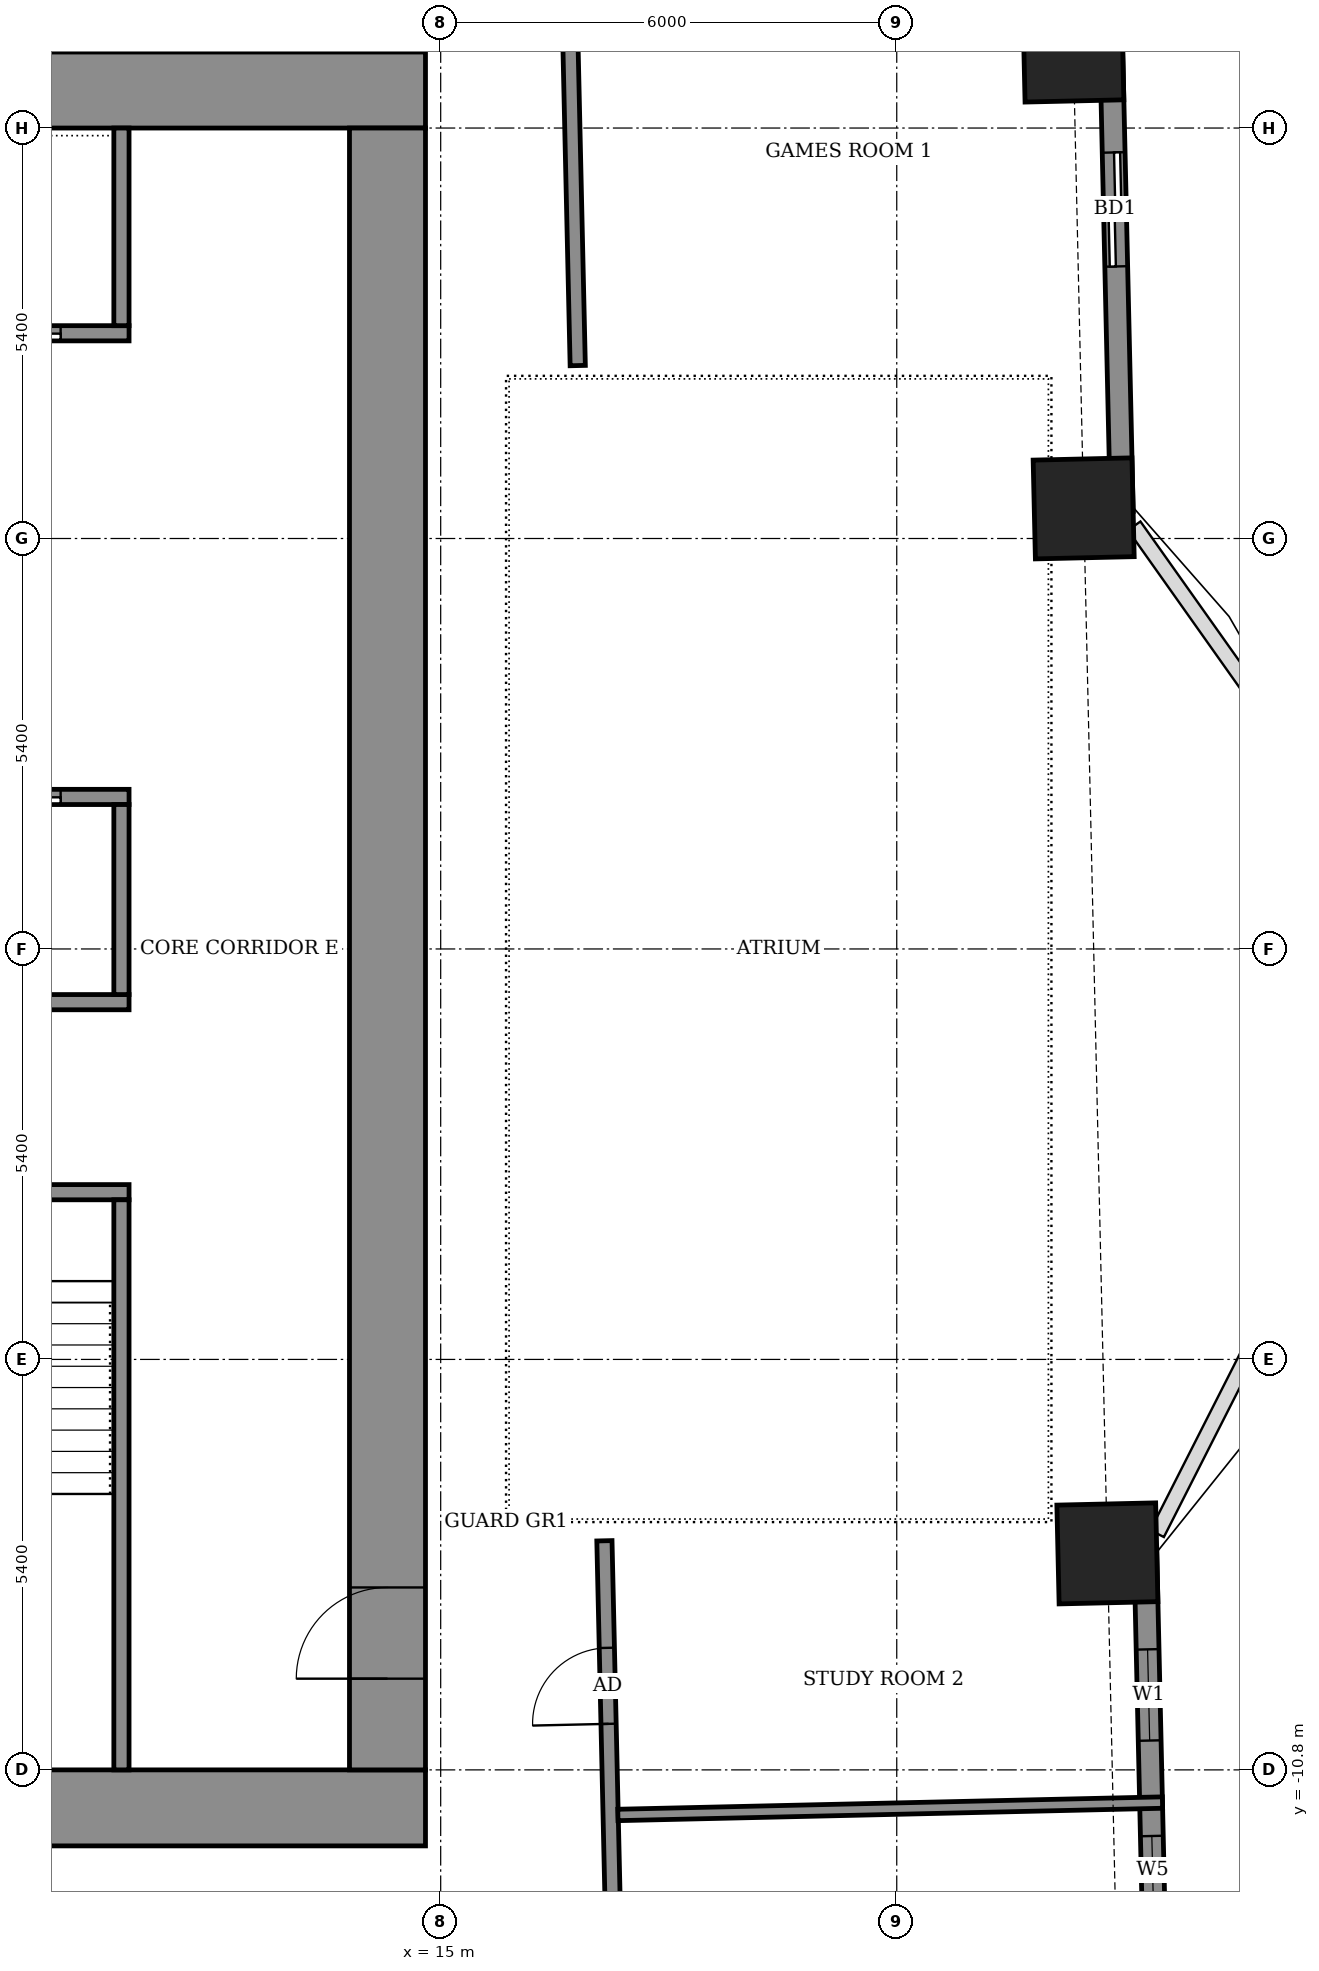
"""IFC4 building model, lengths in metres.
Left out: names, types, materials, properties, quantities, classifications, styles, units other than length and angle.
Written with IfcOpenShell. Run it as: python <this file> out.ifc"""

import sys

from ifc_helpers import new_model, si_unit, direction, frame, frame_2d, origin, origin_2d, place, context, subcontext, project, spatial, rectangle, extrude, element, fill, save


model = new_model("IFC4")
c1 = context("Model", 3, precision=1e-05, world=origin(), true_north=direction((0.0, 1.0)))
c2 = subcontext(c1, "Body", "Model", "MODEL_VIEW")
j1 = project(units=[si_unit("LENGTHUNIT", "METRE"), si_unit("PLANEANGLEUNIT", "RADIAN")], contexts=[c1])
p1 = place(None, origin())
s1 = spatial("IfcSite", under=j1, at=p1, CompositionType="ELEMENT")
p2 = place(p1, origin())
s2 = spatial("IfcBuilding", under=s1, at=p2, CompositionType="ELEMENT")
p3 = place(p2, frame((0.0, 0.0, 137.3)))
s3 = spatial("IfcBuildingStorey", under=s2, at=p3, CompositionType="ELEMENT", Elevation=137.3)
for number, where, z_axis, x_axis in (
    (1, (23.771, -7.952, -0.55), (0.0, 0.0, 1.0), (-0.023, 1.0, 0.0)),
    (2, (23.459, 5.796, -0.55), (0.0, 0.0, 1.0), (-0.023, 1.0, 0.0)),
    (3, (23.323, 11.806, -0.55), (0.0, 0.0, 1.0), (-0.023, 1.0, 0.0)),
):
    element("IfcColumn", number, at=place(p3, frame(where, z_axis=z_axis, x_axis=x_axis)), inside=s3, PredefinedType="COLUMN", context=c2, shape_type="SweptSolid", body=[
        extrude(rectangle(XDim=1.3, YDim=1.3, at=origin_2d()), origin(), (0.0, 0.0, 1.0), 3.6),
    ])
p4 = place(p3, frame((24.518, -18.812, 0.0), z_axis=(0.0, 0.0, 1.0), x_axis=(-0.02269451316, 0.999742446369, 0.0)))
e4 = element("IfcWall", 4, at=p4, inside=s3, PredefinedType="SOLIDWALL", context=c2, shape_type="SweptSolid", body=[
    extrude(rectangle(XDim=10.93, YDim=0.3, at=frame_2d((5.465, 0.0))), origin(), (0.0, 0.0, 1.0), 3.05),
])
p5 = place(p4, frame((1.496, 0.0, 0.0)))
e5 = element("IfcOpeningElement", 5, at=p5, cuts=e4, PredefinedType="OPENING", context=c2, shape_type="SweptSolid", body=[
    extrude(rectangle(XDim=1.5, YDim=2.4, at=frame_2d((0.75, 1.2))), frame((0.0, 0.16, 0.0), z_axis=(0.0, -1.0, 0.0), x_axis=(1.0, 0.0, 0.0)), (0.0, 0.0, 1.0), 0.32),
])
p6 = place(p4, frame((6.244, 0.0, 0.9)))
e6 = element("IfcOpeningElement", 6, at=p6, cuts=e4, PredefinedType="OPENING", context=c2, shape_type="SweptSolid", body=[
    extrude(rectangle(XDim=0.9, YDim=1.5, at=frame_2d((0.45, 0.75))), frame((0.0, 0.16, 0.0), z_axis=(0.0, -1.0, 0.0), x_axis=(1.0, 0.0, 0.0)), (0.0, 0.0, 1.0), 0.32),
])
p7 = place(p4, frame((8.4, 0.0, 0.9)))
e7 = element("IfcOpeningElement", 7, at=p7, cuts=e4, PredefinedType="OPENING", context=c2, shape_type="SweptSolid", body=[
    extrude(rectangle(XDim=1.2, YDim=1.5, at=frame_2d((0.6, 0.75))), frame((0.0, 0.16, 0.0), z_axis=(0.0, -1.0, 0.0), x_axis=(1.0, 0.0, 0.0)), (0.0, 0.0, 1.0), 0.32),
])
p8 = place(p3, frame((23.961, 5.752, 0.0), z_axis=(0.0, 0.0, 1.0), x_axis=(-0.022715362207, 0.999741972871, 0.0)))
e8 = element("IfcWall", 8, at=p8, inside=s3, PredefinedType="SOLIDWALL", context=c2, shape_type="SweptSolid", body=[
    extrude(rectangle(XDim=11.93, YDim=0.3, at=frame_2d((5.965, 0.0))), origin(), (0.0, 0.0, 1.0), 3.05),
])
p9 = place(p8, frame((3.228, 0.0, 0.0)))
e9 = element("IfcOpeningElement", 9, at=p9, cuts=e8, PredefinedType="OPENING", context=c2, shape_type="SweptSolid", body=[
    extrude(rectangle(XDim=1.5, YDim=2.4, at=frame_2d((0.75, 1.2))), frame((0.0, 0.16, 0.0), z_axis=(0.0, -1.0, 0.0), x_axis=(1.0, 0.0, 0.0)), (0.0, 0.0, 1.0), 0.32),
])
p10 = place(p8, frame((7.629, 0.0, 0.9)))
e10 = element("IfcOpeningElement", 10, at=p10, cuts=e8, PredefinedType="OPENING", context=c2, shape_type="SweptSolid", body=[
    extrude(rectangle(XDim=0.9, YDim=1.5, at=frame_2d((0.45, 0.75))), frame((0.0, 0.16, 0.0), z_axis=(0.0, -1.0, 0.0), x_axis=(1.0, 0.0, 0.0)), (0.0, 0.0, 1.0), 0.32),
])
p11 = place(p8, frame((9.316, 0.0, 0.9)))
e11 = element("IfcOpeningElement", 11, at=p11, cuts=e8, PredefinedType="OPENING", context=c2, shape_type="SweptSolid", body=[
    extrude(rectangle(XDim=1.2, YDim=1.5, at=frame_2d((0.6, 0.75))), frame((0.0, 0.16, 0.0), z_axis=(0.0, -1.0, 0.0), x_axis=(1.0, 0.0, 0.0)), (0.0, 0.0, 1.0), 0.32),
])
p12 = place(p3, frame((17.328, -15.448, 0.0), z_axis=(0.0, 0.0, 1.0), x_axis=(-0.022680883318, 0.999742755679, 0.0)))
e12 = element("IfcWall", 12, at=p12, inside=s3, PredefinedType="PARTITIONING", context=c2, shape_type="SweptSolid", body=[
    extrude(rectangle(XDim=7.664, YDim=0.2, at=frame_2d((3.832, 0.0))), origin(), (0.0, 0.0, 1.0), 3.05),
])
p13 = place(p12, frame((5.255, 0.0, 0.0)))
e13 = element("IfcOpeningElement", 13, at=p13, cuts=e12, PredefinedType="OPENING", context=c2, shape_type="SweptSolid", body=[
    extrude(rectangle(XDim=1.0, YDim=2.1, at=frame_2d((0.5, 1.05))), frame((0.0, 0.11, 0.0), z_axis=(0.0, -1.0, 0.0), x_axis=(1.0, 0.0, 0.0)), (0.0, 0.0, 1.0), 0.22),
])
p14 = place(p3, frame((17.331, -11.393, 0.0), z_axis=(0.0, 0.0, 1.0), x_axis=(0.999741061159, 0.022755452803, 0.0)))
e14 = element("IfcWall", 14, at=p14, inside=s3, PredefinedType="PARTITIONING", context=c2, shape_type="SweptSolid", body=[
    extrude(rectangle(XDim=7.167, YDim=0.15, at=frame_2d((3.583, 0.0))), origin(), (0.0, 0.0, 1.0), 2.55),
])
p15 = place(p3, frame((16.803, 7.675, 0.0), z_axis=(0.0, 0.0, 1.0), x_axis=(-0.022667483124, 0.999743059595, 0.0)))
e15 = element("IfcWall", 15, at=p15, inside=s3, PredefinedType="PARTITIONING", context=c2, shape_type="SweptSolid", body=[
    extrude(rectangle(XDim=5.245, YDim=0.2, at=frame_2d((2.623, 0.0))), origin(), (0.0, 0.0, 1.0), 3.05),
])
for number, where, z_axis, x_axis in (
    (16, (-14.8, -11.3, 0.0), (0.0, 0.0, 1.0), (1.0, 0.0, 0.0)),
    (17, (-14.8, 11.3, 0.0), (0.0, 0.0, 1.0), (1.0, 0.0, 0.0)),
):
    element("IfcWall", number, at=place(p3, frame(where, z_axis=z_axis, x_axis=x_axis)), inside=s3, PredefinedType="SHEAR", context=c2, shape_type="SweptSolid", body=[
        extrude(rectangle(XDim=29.6, YDim=1.0, at=frame_2d((14.8, 0.0))), origin(), (0.0, 0.0, 1.0), 3.6),
    ])
p16 = place(p3, frame((14.3, -10.8, 0.0), z_axis=(0.0, 0.0, 1.0), x_axis=(0.0, 1.0, 0.0)))
e18 = element("IfcWall", 18, at=p16, inside=s3, PredefinedType="SHEAR", context=c2, shape_type="SweptSolid", body=[
    extrude(rectangle(XDim=21.6, YDim=1.0, at=frame_2d((10.8, 0.0))), origin(), (0.0, 0.0, 1.0), 3.6),
])
p17 = place(p16, frame((1.2, 0.0, 0.0)))
e19 = element("IfcOpeningElement", 19, at=p17, cuts=e18, PredefinedType="OPENING", context=c2, shape_type="SweptSolid", body=[
    extrude(rectangle(XDim=1.2, YDim=2.1, at=frame_2d((0.6, 1.05))), frame((0.0, 0.51, 0.0), z_axis=(0.0, -1.0, 0.0), x_axis=(1.0, 0.0, 0.0)), (0.0, 0.0, 1.0), 1.02),
])
p18 = place(p3, frame((-10.9, -3.2, 0.0), z_axis=(0.0, 0.0, 1.0), x_axis=(1.0, 0.0, 0.0)))
e20 = element("IfcWall", 20, at=p18, inside=s3, PredefinedType="SHEAR", context=c2, shape_type="SweptSolid", body=[
    extrude(rectangle(XDim=21.8, YDim=0.2, at=frame_2d((10.9, 0.0))), origin(), (0.0, 0.0, 1.0), 3.05),
])
p19 = place(p18, frame((1.075, 0.0, 0.0)))
e21 = element("IfcOpeningElement", 21, at=p19, cuts=e20, PredefinedType="OPENING", context=c2, shape_type="SweptSolid", body=[
    extrude(rectangle(XDim=1.1, YDim=2.1, at=frame_2d((0.55, 1.05))), frame((0.0, 0.11, 0.0), z_axis=(0.0, -1.0, 0.0), x_axis=(1.0, 0.0, 0.0)), (0.0, 0.0, 1.0), 0.22),
])
p20 = place(p18, frame((10.325, 0.0, 0.0)))
e22 = element("IfcOpeningElement", 22, at=p20, cuts=e20, PredefinedType="OPENING", context=c2, shape_type="SweptSolid", body=[
    extrude(rectangle(XDim=1.1, YDim=2.1, at=frame_2d((0.55, 1.05))), frame((0.0, 0.11, 0.0), z_axis=(0.0, -1.0, 0.0), x_axis=(1.0, 0.0, 0.0)), (0.0, 0.0, 1.0), 0.22),
])
p21 = place(p18, frame((19.625, 0.0, 0.0)))
e23 = element("IfcOpeningElement", 23, at=p21, cuts=e20, PredefinedType="OPENING", context=c2, shape_type="SweptSolid", body=[
    extrude(rectangle(XDim=1.1, YDim=2.1, at=frame_2d((0.55, 1.05))), frame((0.0, 0.11, 0.0), z_axis=(0.0, -1.0, 0.0), x_axis=(1.0, 0.0, 0.0)), (0.0, 0.0, 1.0), 0.22),
])
p22 = place(p18, frame((5.7, 0.0, 0.0)))
e24 = element("IfcOpeningElement", 24, at=p22, cuts=e20, PredefinedType="OPENING", context=c2, shape_type="SweptSolid", body=[
    extrude(rectangle(XDim=1.1, YDim=2.1, at=frame_2d((0.55, 1.05))), frame((0.0, 0.11, 0.0), z_axis=(0.0, -1.0, 0.0), x_axis=(1.0, 0.0, 0.0)), (0.0, 0.0, 1.0), 0.22),
])
p23 = place(p18, frame((14.975, 0.0, 0.0)))
e25 = element("IfcOpeningElement", 25, at=p23, cuts=e20, PredefinedType="OPENING", context=c2, shape_type="SweptSolid", body=[
    extrude(rectangle(XDim=1.1, YDim=2.1, at=frame_2d((0.55, 1.05))), frame((0.0, 0.11, 0.0), z_axis=(0.0, -1.0, 0.0), x_axis=(1.0, 0.0, 0.0)), (0.0, 0.0, 1.0), 0.22),
])
p24 = place(p3, frame((-10.9, -0.7, 0.0), z_axis=(0.0, 0.0, 1.0), x_axis=(1.0, 0.0, 0.0)))
e26 = element("IfcWall", 26, at=p24, inside=s3, PredefinedType="SHEAR", context=c2, shape_type="SweptSolid", body=[
    extrude(rectangle(XDim=21.8, YDim=0.2, at=frame_2d((10.9, 0.0))), origin(), (0.0, 0.0, 1.0), 3.05),
])
p25 = place(p3, frame((-10.9, 2.0, 0.0), z_axis=(0.0, 0.0, 1.0), x_axis=(1.0, 0.0, 0.0)))
e27 = element("IfcWall", 27, at=p25, inside=s3, PredefinedType="SHEAR", context=c2, shape_type="SweptSolid", body=[
    extrude(rectangle(XDim=21.8, YDim=0.2, at=frame_2d((10.9, 0.0))), origin(), (0.0, 0.0, 1.0), 3.05),
])
p26 = place(p25, frame((14.4, 0.0, 0.0)))
e28 = element("IfcOpeningElement", 28, at=p26, cuts=e27, PredefinedType="OPENING", context=c2, shape_type="SweptSolid", body=[
    extrude(rectangle(XDim=1.1, YDim=2.1, at=frame_2d((0.55, 1.05))), frame((0.0, 0.11, 0.0), z_axis=(0.0, -1.0, 0.0), x_axis=(1.0, 0.0, 0.0)), (0.0, 0.0, 1.0), 0.22),
])
p27 = place(p25, frame((17.1, 0.0, 0.0)))
e29 = element("IfcOpeningElement", 29, at=p27, cuts=e27, PredefinedType="OPENING", context=c2, shape_type="SweptSolid", body=[
    extrude(rectangle(XDim=1.1, YDim=2.1, at=frame_2d((0.55, 1.05))), frame((0.0, 0.11, 0.0), z_axis=(0.0, -1.0, 0.0), x_axis=(1.0, 0.0, 0.0)), (0.0, 0.0, 1.0), 0.22),
])
p28 = place(p25, frame((19.8, 0.0, 0.0)))
e30 = element("IfcOpeningElement", 30, at=p28, cuts=e27, PredefinedType="OPENING", context=c2, shape_type="SweptSolid", body=[
    extrude(rectangle(XDim=1.1, YDim=2.1, at=frame_2d((0.55, 1.05))), frame((0.0, 0.11, 0.0), z_axis=(0.0, -1.0, 0.0), x_axis=(1.0, 0.0, 0.0)), (0.0, 0.0, 1.0), 0.22),
])
p29 = place(p25, frame((6.4, 0.0, 0.0)))
e31 = element("IfcOpeningElement", 31, at=p29, cuts=e27, PredefinedType="OPENING", context=c2, shape_type="SweptSolid", body=[
    extrude(rectangle(XDim=0.9, YDim=2.1, at=frame_2d((0.45, 1.05))), frame((0.0, 0.11, 0.0), z_axis=(0.0, -1.0, 0.0), x_axis=(1.0, 0.0, 0.0)), (0.0, 0.0, 1.0), 0.22),
])
p30 = place(p3, frame((-10.9, 8.1, 0.0), z_axis=(0.0, 0.0, 1.0), x_axis=(1.0, 0.0, 0.0)))
e32 = element("IfcWall", 32, at=p30, inside=s3, PredefinedType="SHEAR", context=c2, shape_type="SweptSolid", body=[
    extrude(rectangle(XDim=21.8, YDim=0.2, at=frame_2d((10.9, 0.0))), origin(), (0.0, 0.0, 1.0), 3.05),
])
p31 = place(p30, frame((14.4, 0.0, 0.0)))
e33 = element("IfcOpeningElement", 33, at=p31, cuts=e32, PredefinedType="OPENING", context=c2, shape_type="SweptSolid", body=[
    extrude(rectangle(XDim=1.1, YDim=2.1, at=frame_2d((0.55, 1.05))), frame((0.0, 0.11, 0.0), z_axis=(0.0, -1.0, 0.0), x_axis=(1.0, 0.0, 0.0)), (0.0, 0.0, 1.0), 0.22),
])
p32 = place(p30, frame((17.1, 0.0, 0.0)))
e34 = element("IfcOpeningElement", 34, at=p32, cuts=e32, PredefinedType="OPENING", context=c2, shape_type="SweptSolid", body=[
    extrude(rectangle(XDim=1.1, YDim=2.1, at=frame_2d((0.55, 1.05))), frame((0.0, 0.11, 0.0), z_axis=(0.0, -1.0, 0.0), x_axis=(1.0, 0.0, 0.0)), (0.0, 0.0, 1.0), 0.22),
])
p33 = place(p30, frame((19.8, 0.0, 0.0)))
e35 = element("IfcOpeningElement", 35, at=p33, cuts=e32, PredefinedType="OPENING", context=c2, shape_type="SweptSolid", body=[
    extrude(rectangle(XDim=1.1, YDim=2.1, at=frame_2d((0.55, 1.05))), frame((0.0, 0.11, 0.0), z_axis=(0.0, -1.0, 0.0), x_axis=(1.0, 0.0, 0.0)), (0.0, 0.0, 1.0), 0.22),
])
p34 = place(p30, frame((1.675, 0.0, 0.0)))
e36 = element("IfcOpeningElement", 36, at=p34, cuts=e32, PredefinedType="OPENING", context=c2, shape_type="SweptSolid", body=[
    extrude(rectangle(XDim=0.9, YDim=2.1, at=frame_2d((0.45, 1.05))), frame((0.0, 0.11, 0.0), z_axis=(0.0, -1.0, 0.0), x_axis=(1.0, 0.0, 0.0)), (0.0, 0.0, 1.0), 0.22),
])
p35 = place(p30, frame((8.425, 0.0, 0.0)))
e37 = element("IfcOpeningElement", 37, at=p35, cuts=e32, PredefinedType="OPENING", context=c2, shape_type="SweptSolid", body=[
    extrude(rectangle(XDim=0.9, YDim=2.1, at=frame_2d((0.45, 1.05))), frame((0.0, 0.11, 0.0), z_axis=(0.0, -1.0, 0.0), x_axis=(1.0, 0.0, 0.0)), (0.0, 0.0, 1.0), 0.22),
])
p36 = place(p3, frame((10.8, -10.8, 0.0), z_axis=(0.0, 0.0, 1.0), x_axis=(0.0, 1.0, 0.0)))
e38 = element("IfcWall", 38, at=p36, inside=s3, PredefinedType="SHEAR", context=c2, shape_type="SweptSolid", body=[
    extrude(rectangle(XDim=7.5, YDim=0.2, at=frame_2d((3.75, 0.0))), origin(), (0.0, 0.0, 1.0), 3.05),
])
p37 = place(p3, frame((10.8, -0.6, 0.0), z_axis=(0.0, 0.0, 1.0), x_axis=(0.0, 1.0, 0.0)))
e39 = element("IfcWall", 39, at=p37, inside=s3, PredefinedType="SHEAR", context=c2, shape_type="SweptSolid", body=[
    extrude(rectangle(XDim=2.5, YDim=0.2, at=frame_2d((1.25, 0.0))), origin(), (0.0, 0.0, 1.0), 3.05),
])
p38 = place(p3, frame((10.8, 8.2, 0.0), z_axis=(0.0, 0.0, 1.0), x_axis=(0.0, 1.0, 0.0)))
e40 = element("IfcWall", 40, at=p38, inside=s3, PredefinedType="SHEAR", context=c2, shape_type="SweptSolid", body=[
    extrude(rectangle(XDim=2.6, YDim=0.2, at=frame_2d((1.3, 0.0))), origin(), (0.0, 0.0, 1.0), 3.05),
])
p39 = place(p6, origin())
e41 = element("IfcWindow", 41, at=p39, inside=s3, PartitioningType="SINGLE_PANEL", PredefinedType="WINDOW", context=c2, shape_type="SweptSolid", body=[
    extrude(rectangle(XDim=0.9, YDim=1.5, at=frame_2d((0.45, 0.75))), frame((0.0, 0.03, 0.0), z_axis=(0.0, -1.0, 0.0), x_axis=(1.0, 0.0, 0.0)), (0.0, 0.0, 1.0), 0.06),
])
fill(e6, e41)
p40 = place(p7, origin())
e42 = element("IfcWindow", 42, at=p40, inside=s3, PartitioningType="SINGLE_PANEL", PredefinedType="WINDOW", context=c2, shape_type="SweptSolid", body=[
    extrude(rectangle(XDim=1.2, YDim=1.5, at=frame_2d((0.6, 0.75))), frame((0.0, 0.03, 0.0), z_axis=(0.0, -1.0, 0.0), x_axis=(1.0, 0.0, 0.0)), (0.0, 0.0, 1.0), 0.06),
])
fill(e7, e42)
p41 = place(p9, origin())
e43 = element("IfcDoor", 43, at=p41, inside=s3, OperationType="SLIDING_TO_LEFT", PredefinedType="DOOR", context=c2, shape_type="SweptSolid", body=[
    extrude(rectangle(XDim=1.5, YDim=2.4, at=frame_2d((0.75, 1.2))), frame((0.0, 0.025, 0.0), z_axis=(0.0, -1.0, 0.0), x_axis=(1.0, 0.0, 0.0)), (0.0, 0.0, 1.0), 0.05),
])
fill(e9, e43)
p42 = place(p13, origin())
e44 = element("IfcDoor", 44, at=p42, inside=s3, OperationType="SINGLE_SWING_RIGHT", PredefinedType="DOOR", context=c2, shape_type="SweptSolid", body=[
    extrude(rectangle(XDim=1.0, YDim=2.1, at=frame_2d((0.5, 1.05))), frame((0.0, 0.025, 0.0), z_axis=(0.0, -1.0, 0.0), x_axis=(1.0, 0.0, 0.0)), (0.0, 0.0, 1.0), 0.05),
])
fill(e13, e44)
p43 = place(p17, origin())
e45 = element("IfcDoor", 45, at=p43, inside=s3, OperationType="DOUBLE_DOOR_SINGLE_SWING", PredefinedType="DOOR", context=c2, shape_type="SweptSolid", body=[
    extrude(rectangle(XDim=1.2, YDim=2.1, at=frame_2d((0.6, 1.05))), frame((0.0, 0.025, 0.0), z_axis=(0.0, -1.0, 0.0), x_axis=(1.0, 0.0, 0.0)), (0.0, 0.0, 1.0), 0.05),
])
fill(e19, e45)
p44 = place(p28, origin())
e46 = element("IfcDoor", 46, at=p44, inside=s3, OperationType="SLIDING_TO_LEFT", PredefinedType="DOOR", context=c2, shape_type="SweptSolid", body=[
    extrude(rectangle(XDim=1.1, YDim=2.1, at=frame_2d((0.55, 1.05))), frame((0.0, 0.025, 0.0), z_axis=(0.0, -1.0, 0.0), x_axis=(1.0, 0.0, 0.0)), (0.0, 0.0, 1.0), 0.05),
])
fill(e30, e46)
p45 = place(p33, origin())
e47 = element("IfcDoor", 47, at=p45, inside=s3, OperationType="SLIDING_TO_LEFT", PredefinedType="DOOR", context=c2, shape_type="SweptSolid", body=[
    extrude(rectangle(XDim=1.1, YDim=2.1, at=frame_2d((0.55, 1.05))), frame((0.0, 0.025, 0.0), z_axis=(0.0, -1.0, 0.0), x_axis=(1.0, 0.0, 0.0)), (0.0, 0.0, 1.0), 0.05),
])
fill(e35, e47)
save(model, sys.argv[1])
